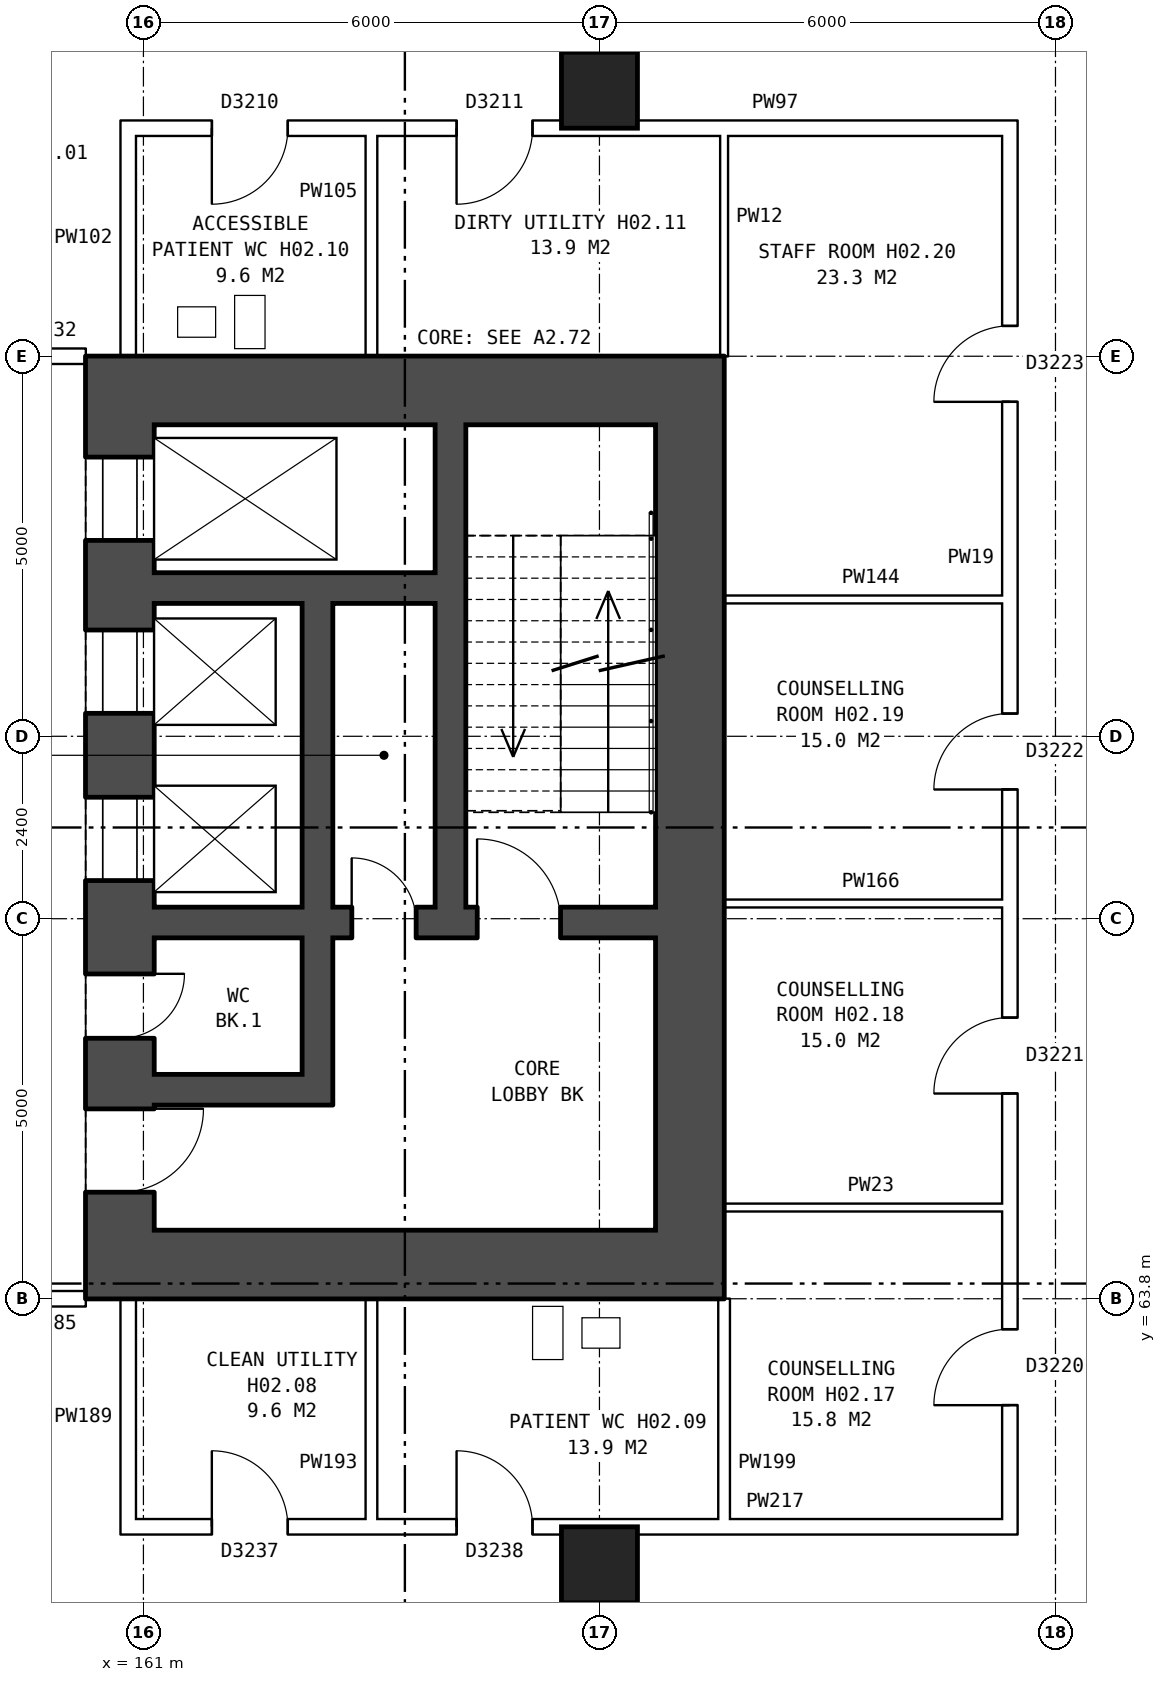
"""IFC4 building model, lengths in metres.
Left out: names, types, materials, properties, quantities, classifications, styles, units other than length and angle.
Written with IfcOpenShell. Run it as: python <this file> out.ifc"""

import sys

from ifc_helpers import new_model, si_unit, direction, frame, frame_2d, origin, origin_2d, place, context, subcontext, project, spatial, rectangle, extrude, element, fill, save


model = new_model("IFC4")
c1 = context("Model", 3, precision=1e-05, world=origin(), true_north=direction((0.0, 1.0)))
c2 = subcontext(c1, "Body", "Model", "MODEL_VIEW")
j1 = project(units=[si_unit("LENGTHUNIT", "METRE"), si_unit("PLANEANGLEUNIT", "RADIAN")], contexts=[c1])
p1 = place(None, origin())
s1 = spatial("IfcSite", under=j1, at=p1, CompositionType="ELEMENT")
p2 = place(p1, origin())
s2 = spatial("IfcBuilding", under=s1, at=p2, CompositionType="ELEMENT")
p3 = place(p2, frame((0.0, 0.0, 10.1)))
s3 = spatial("IfcBuildingStorey", under=s2, at=p3, CompositionType="ELEMENT", Elevation=10.1)
for number, where, z_axis, x_axis in (
    (1, (167.0, 60.3, 0.0), (0.0, 0.0, 1.0), (1.0, 0.0, 0.0)),
    (2, (167.0, 79.7, 0.0), (0.0, 0.0, 1.0), (1.0, 0.0, 0.0)),
):
    element("IfcColumn", number, at=place(p3, frame(where, z_axis=z_axis, x_axis=x_axis)), inside=s3, PredefinedType="COLUMN", context=c2, shape_type="SweptSolid", body=[
        extrude(rectangle(XDim=1.0, YDim=1.0, at=origin_2d()), origin(), (0.0, 0.0, 1.0), 4.3),
    ])
p4 = place(p3, frame((160.69, 75.3, 0.0), z_axis=(0.0, 0.0, 1.0), x_axis=(0.0, -1.0, 0.0)))
e3 = element("IfcWall", 3, at=p4, inside=s3, PredefinedType="SHEAR", context=c2, shape_type="SweptSolid", body=[
    extrude(rectangle(XDim=10.6, YDim=0.9, at=frame_2d((5.3, 0.0))), origin(), (0.0, 0.0, 1.0), 4.3),
])
p5 = place(p4, frame((0.425, 0.0, 0.0)))
e4 = element("IfcOpeningElement", 4, at=p5, cuts=e3, PredefinedType="OPENING", context=c2, shape_type="SweptSolid", body=[
    extrude(rectangle(XDim=1.1, YDim=2.1, at=frame_2d((0.55, 1.05))), frame((0.0, 0.46, 0.0), z_axis=(0.0, -1.0, 0.0), x_axis=(1.0, 0.0, 0.0)), (0.0, 0.0, 1.0), 0.92),
])
p6 = place(p4, frame((2.7, 0.0, 0.0)))
e5 = element("IfcOpeningElement", 5, at=p6, cuts=e3, PredefinedType="OPENING", context=c2, shape_type="SweptSolid", body=[
    extrude(rectangle(XDim=1.1, YDim=2.1, at=frame_2d((0.55, 1.05))), frame((0.0, 0.46, 0.0), z_axis=(0.0, -1.0, 0.0), x_axis=(1.0, 0.0, 0.0)), (0.0, 0.0, 1.0), 0.92),
])
p7 = place(p4, frame((4.9, 0.0, 0.0)))
e6 = element("IfcOpeningElement", 6, at=p7, cuts=e3, PredefinedType="OPENING", context=c2, shape_type="SweptSolid", body=[
    extrude(rectangle(XDim=1.1, YDim=2.1, at=frame_2d((0.55, 1.05))), frame((0.0, 0.46, 0.0), z_axis=(0.0, -1.0, 0.0), x_axis=(1.0, 0.0, 0.0)), (0.0, 0.0, 1.0), 0.92),
])
p8 = place(p4, frame((9.0, 0.0, 0.0)))
e7 = element("IfcOpeningElement", 7, at=p8, cuts=e3, PredefinedType="OPENING", context=c2, shape_type="SweptSolid", body=[
    extrude(rectangle(XDim=1.1, YDim=2.1, at=frame_2d((0.55, 1.05))), frame((0.0, 0.46, 0.0), z_axis=(0.0, -1.0, 0.0), x_axis=(1.0, 0.0, 0.0)), (0.0, 0.0, 1.0), 0.92),
])
p9 = place(p4, frame((7.225, 0.0, 0.0)))
e8 = element("IfcOpeningElement", 8, at=p9, cuts=e3, PredefinedType="OPENING", context=c2, shape_type="SweptSolid", body=[
    extrude(rectangle(XDim=0.85, YDim=2.1, at=frame_2d((0.425, 1.05))), frame((0.0, 0.46, 0.0), z_axis=(0.0, -1.0, 0.0), x_axis=(1.0, 0.0, 0.0)), (0.0, 0.0, 1.0), 0.92),
])
p10 = place(p3, frame((168.19, 75.3, 0.0), z_axis=(0.0, 0.0, 1.0), x_axis=(0.0, -1.0, 0.0)))
e9 = element("IfcWall", 9, at=p10, inside=s3, PredefinedType="SHEAR", context=c2, shape_type="SweptSolid", body=[
    extrude(rectangle(XDim=10.6, YDim=0.9, at=frame_2d((5.3, 0.0))), origin(), (0.0, 0.0, 1.0), 4.3),
])
for number, where, z_axis, x_axis in (
    (10, (160.24, 75.75, 0.0), (0.0, 0.0, 1.0), (1.0, 0.0, 0.0)),
    (11, (160.24, 64.25, 0.0), (0.0, 0.0, 1.0), (1.0, 0.0, 0.0)),
):
    element("IfcWall", number, at=place(p3, frame(where, z_axis=z_axis, x_axis=x_axis)), inside=s3, PredefinedType="SHEAR", context=c2, shape_type="SweptSolid", body=[
        extrude(rectangle(XDim=8.4, YDim=0.9, at=frame_2d((4.2, 0.0))), origin(), (0.0, 0.0, 1.0), 4.3),
    ])
p11 = place(p3, frame((161.14, 73.15, 0.0), z_axis=(0.0, 0.0, 1.0), x_axis=(1.0, 0.0, 0.0)))
e12 = element("IfcWall", 12, at=p11, inside=s3, PredefinedType="SHEAR", context=c2, shape_type="SweptSolid", body=[
    extrude(rectangle(XDim=3.7, YDim=0.4, at=frame_2d((1.85, 0.0))), origin(), (0.0, 0.0, 1.0), 4.3),
])
p12 = place(p3, frame((161.14, 68.75, 0.0), z_axis=(0.0, 0.0, 1.0), x_axis=(1.0, 0.0, 0.0)))
e13 = element("IfcWall", 13, at=p12, inside=s3, PredefinedType="SHEAR", context=c2, shape_type="SweptSolid", body=[
    extrude(rectangle(XDim=6.6, YDim=0.4, at=frame_2d((3.3, 0.0))), origin(), (0.0, 0.0, 1.0), 4.3),
])
p13 = place(p12, frame((4.25, 0.0, 0.0)))
e14 = element("IfcOpeningElement", 14, at=p13, cuts=e13, PredefinedType="OPENING", context=c2, shape_type="SweptSolid", body=[
    extrude(rectangle(XDim=1.1, YDim=2.1, at=frame_2d((0.55, 1.05))), frame((0.0, 0.21, 0.0), z_axis=(0.0, -1.0, 0.0), x_axis=(1.0, 0.0, 0.0)), (0.0, 0.0, 1.0), 0.42),
])
p14 = place(p12, frame((2.6, 0.0, 0.0)))
e15 = element("IfcOpeningElement", 15, at=p14, cuts=e13, PredefinedType="OPENING", context=c2, shape_type="SweptSolid", body=[
    extrude(rectangle(XDim=0.85, YDim=2.1, at=frame_2d((0.425, 1.05))), frame((0.0, 0.21, 0.0), z_axis=(0.0, -1.0, 0.0), x_axis=(1.0, 0.0, 0.0)), (0.0, 0.0, 1.0), 0.42),
])
p15 = place(p3, frame((161.14, 66.55, 0.0), z_axis=(0.0, 0.0, 1.0), x_axis=(1.0, 0.0, 0.0)))
e16 = element("IfcWall", 16, at=p15, inside=s3, PredefinedType="SHEAR", context=c2, shape_type="SweptSolid", body=[
    extrude(rectangle(XDim=1.95, YDim=0.4, at=frame_2d((0.975, 0.0))), origin(), (0.0, 0.0, 1.0), 4.3),
])
p16 = place(p3, frame((163.29, 72.95, 0.0), z_axis=(0.0, 0.0, 1.0), x_axis=(0.0, -1.0, 0.0)))
e17 = element("IfcWall", 17, at=p16, inside=s3, PredefinedType="SHEAR", context=c2, shape_type="SweptSolid", body=[
    extrude(rectangle(XDim=4.0, YDim=0.4, at=frame_2d((2.0, 0.0))), origin(), (0.0, 0.0, 1.0), 4.3),
])
p17 = place(p3, frame((163.29, 68.55, 0.0), z_axis=(0.0, 0.0, 1.0), x_axis=(0.0, -1.0, 0.0)))
e18 = element("IfcWall", 18, at=p17, inside=s3, PredefinedType="SHEAR", context=c2, shape_type="SweptSolid", body=[
    extrude(rectangle(XDim=2.2, YDim=0.4, at=frame_2d((1.1, 0.0))), origin(), (0.0, 0.0, 1.0), 4.3),
])
p18 = place(p3, frame((165.04, 75.3, 0.0), z_axis=(0.0, 0.0, 1.0), x_axis=(0.0, -1.0, 0.0)))
e19 = element("IfcWall", 19, at=p18, inside=s3, PredefinedType="SHEAR", context=c2, shape_type="SweptSolid", body=[
    extrude(rectangle(XDim=6.35, YDim=0.4, at=frame_2d((3.175, 0.0))), origin(), (0.0, 0.0, 1.0), 4.3),
])
p19 = place(p3, frame((160.7, 60.8, 0.0), z_axis=(0.0, 0.0, 1.0), x_axis=(1.0, 0.0, 0.0)))
e20 = element("IfcWall", 20, at=p19, inside=s3, PredefinedType="PARTITIONING", context=c2, shape_type="SweptSolid", body=[
    extrude(rectangle(XDim=11.8, YDim=0.2, at=frame_2d((5.9, 0.0))), origin(), (0.0, 0.0, 1.0), 4.3),
])
p20 = place(p19, frame((1.2, 0.0, 0.0)))
e21 = element("IfcOpeningElement", 21, at=p20, cuts=e20, PredefinedType="OPENING", context=c2, shape_type="SweptSolid", body=[
    extrude(rectangle(XDim=1.0, YDim=2.1, at=frame_2d((0.5, 1.05))), frame((0.0, 0.11, 0.0), z_axis=(0.0, -1.0, 0.0), x_axis=(1.0, 0.0, 0.0)), (0.0, 0.0, 1.0), 0.22),
])
p21 = place(p19, frame((4.42, 0.0, 0.0)))
e22 = element("IfcOpeningElement", 22, at=p21, cuts=e20, PredefinedType="OPENING", context=c2, shape_type="SweptSolid", body=[
    extrude(rectangle(XDim=1.0, YDim=2.1, at=frame_2d((0.5, 1.05))), frame((0.0, 0.11, 0.0), z_axis=(0.0, -1.0, 0.0), x_axis=(1.0, 0.0, 0.0)), (0.0, 0.0, 1.0), 0.22),
])
p22 = place(p3, frame((157.65, 63.8, 0.0), z_axis=(0.0, 0.0, 1.0), x_axis=(1.0, 0.0, 0.0)))
e23 = element("IfcWall", 23, at=p22, inside=s3, PredefinedType="PARTITIONING", context=c2, shape_type="SweptSolid", body=[
    extrude(rectangle(XDim=2.59, YDim=0.2, at=frame_2d((1.295, 0.0))), origin(), (0.0, 0.0, 1.0), 4.3),
])
p23 = place(p22, frame((0.59, 0.0, 0.0)))
e24 = element("IfcOpeningElement", 24, at=p23, cuts=e23, PredefinedType="OPENING", context=c2, shape_type="SweptSolid", body=[
    extrude(rectangle(XDim=1.0, YDim=2.1, at=frame_2d((0.5, 1.05))), frame((0.0, 0.11, 0.0), z_axis=(0.0, -1.0, 0.0), x_axis=(1.0, 0.0, 0.0)), (0.0, 0.0, 1.0), 0.22),
])
for number, where, z_axis, x_axis in (
    (25, (168.64, 65.0, 0.0), (0.0, 0.0, 1.0), (1.0, 0.0, 0.0)),
    (26, (168.64, 69.0, 0.0), (0.0, 0.0, 1.0), (1.0, 0.0, 0.0)),
    (27, (168.64, 73.0, 0.0), (0.0, 0.0, 1.0), (1.0, 0.0, 0.0)),
):
    element("IfcWall", number, at=place(p3, frame(where, z_axis=z_axis, x_axis=x_axis)), inside=s3, PredefinedType="PARTITIONING", context=c2, shape_type="SweptSolid", body=[
        extrude(rectangle(XDim=3.86, YDim=0.1, at=frame_2d((1.93, 0.0))), origin(), (0.0, 0.0, 1.0), 4.3),
    ])
p24 = place(p3, frame((157.65, 76.2, 0.0), z_axis=(0.0, 0.0, 1.0), x_axis=(1.0, 0.0, 0.0)))
e28 = element("IfcWall", 28, at=p24, inside=s3, PredefinedType="PARTITIONING", context=c2, shape_type="SweptSolid", body=[
    extrude(rectangle(XDim=2.59, YDim=0.2, at=frame_2d((1.295, 0.0))), origin(), (0.0, 0.0, 1.0), 4.3),
])
p25 = place(p24, frame((0.59, 0.0, 0.0)))
e29 = element("IfcOpeningElement", 29, at=p25, cuts=e28, PredefinedType="OPENING", context=c2, shape_type="SweptSolid", body=[
    extrude(rectangle(XDim=1.0, YDim=2.1, at=frame_2d((0.5, 1.05))), frame((0.0, 0.11, 0.0), z_axis=(0.0, -1.0, 0.0), x_axis=(1.0, 0.0, 0.0)), (0.0, 0.0, 1.0), 0.22),
])
p26 = place(p3, frame((160.7, 79.2, 0.0), z_axis=(0.0, 0.0, 1.0), x_axis=(1.0, 0.0, 0.0)))
e30 = element("IfcWall", 30, at=p26, inside=s3, PredefinedType="PARTITIONING", context=c2, shape_type="SweptSolid", body=[
    extrude(rectangle(XDim=11.8, YDim=0.2, at=frame_2d((5.9, 0.0))), origin(), (0.0, 0.0, 1.0), 4.3),
])
p27 = place(p26, frame((1.2, 0.0, 0.0)))
e31 = element("IfcOpeningElement", 31, at=p27, cuts=e30, PredefinedType="OPENING", context=c2, shape_type="SweptSolid", body=[
    extrude(rectangle(XDim=1.0, YDim=2.1, at=frame_2d((0.5, 1.05))), frame((0.0, 0.11, 0.0), z_axis=(0.0, -1.0, 0.0), x_axis=(1.0, 0.0, 0.0)), (0.0, 0.0, 1.0), 0.22),
])
p28 = place(p26, frame((4.42, 0.0, 0.0)))
e32 = element("IfcOpeningElement", 32, at=p28, cuts=e30, PredefinedType="OPENING", context=c2, shape_type="SweptSolid", body=[
    extrude(rectangle(XDim=1.0, YDim=2.1, at=frame_2d((0.5, 1.05))), frame((0.0, 0.11, 0.0), z_axis=(0.0, -1.0, 0.0), x_axis=(1.0, 0.0, 0.0)), (0.0, 0.0, 1.0), 0.22),
])
for number, where, z_axis, x_axis in (
    (33, (160.8, 60.7, 0.0), (0.0, 0.0, 1.0), (0.0, 1.0, 0.0)),
    (34, (160.8, 76.2, 0.0), (0.0, 0.0, 1.0), (0.0, 1.0, 0.0)),
):
    element("IfcWall", number, at=place(p3, frame(where, z_axis=z_axis, x_axis=x_axis)), inside=s3, PredefinedType="PARTITIONING", context=c2, shape_type="SweptSolid", body=[
        extrude(rectangle(XDim=3.1, YDim=0.2, at=frame_2d((1.55, 0.0))), origin(), (0.0, 0.0, 1.0), 4.3),
    ])
for number, where, z_axis, x_axis in (
    (35, (164.0, 60.7, 0.0), (0.0, 0.0, 1.0), (0.0, 1.0, 0.0)),
    (36, (164.0, 76.2, 0.0), (0.0, 0.0, 1.0), (0.0, 1.0, 0.0)),
):
    element("IfcWall", number, at=place(p3, frame(where, z_axis=z_axis, x_axis=x_axis)), inside=s3, PredefinedType="PLUMBINGWALL", context=c2, shape_type="SweptSolid", body=[
        extrude(rectangle(XDim=3.1, YDim=0.15, at=frame_2d((1.55, 0.0))), origin(), (0.0, 0.0, 1.0), 4.3),
    ])
p29 = place(p3, frame((168.64, 76.2, 0.0), z_axis=(0.0, 0.0, 1.0), x_axis=(0.0, 1.0, 0.0)))
e37 = element("IfcWall", 37, at=p29, inside=s3, PredefinedType="PARTITIONING", context=c2, shape_type="SweptSolid", body=[
    extrude(rectangle(XDim=3.1, YDim=0.1, at=frame_2d((1.55, 0.0))), origin(), (0.0, 0.0, 1.0), 4.3),
])
p30 = place(p3, frame((168.64, 60.7, 0.0), z_axis=(0.0, 0.0, 1.0), x_axis=(0.0, 1.0, 0.0)))
e38 = element("IfcWall", 38, at=p30, inside=s3, PredefinedType="PLUMBINGWALL", context=c2, shape_type="SweptSolid", body=[
    extrude(rectangle(XDim=3.1, YDim=0.15, at=frame_2d((1.55, 0.0))), origin(), (0.0, 0.0, 1.0), 4.3),
])
p31 = place(p3, frame((172.4, 60.7, 0.0), z_axis=(0.0, 0.0, 1.0), x_axis=(0.0, 1.0, 0.0)))
e39 = element("IfcWall", 39, at=p31, inside=s3, PredefinedType="PARTITIONING", context=c2, shape_type="SweptSolid", body=[
    extrude(rectangle(XDim=18.6, YDim=0.2, at=frame_2d((9.3, 0.0))), origin(), (0.0, 0.0, 1.0), 4.3),
])
p32 = place(p31, frame((1.7, 0.0, 0.0)))
e40 = element("IfcOpeningElement", 40, at=p32, cuts=e39, PredefinedType="OPENING", context=c2, shape_type="SweptSolid", body=[
    extrude(rectangle(XDim=1.0, YDim=2.1, at=frame_2d((0.5, 1.05))), frame((0.0, 0.11, 0.0), z_axis=(0.0, -1.0, 0.0), x_axis=(1.0, 0.0, 0.0)), (0.0, 0.0, 1.0), 0.22),
])
p33 = place(p31, frame((5.8, 0.0, 0.0)))
e41 = element("IfcOpeningElement", 41, at=p33, cuts=e39, PredefinedType="OPENING", context=c2, shape_type="SweptSolid", body=[
    extrude(rectangle(XDim=1.0, YDim=2.1, at=frame_2d((0.5, 1.05))), frame((0.0, 0.11, 0.0), z_axis=(0.0, -1.0, 0.0), x_axis=(1.0, 0.0, 0.0)), (0.0, 0.0, 1.0), 0.22),
])
p34 = place(p31, frame((9.8, 0.0, 0.0)))
e42 = element("IfcOpeningElement", 42, at=p34, cuts=e39, PredefinedType="OPENING", context=c2, shape_type="SweptSolid", body=[
    extrude(rectangle(XDim=1.0, YDim=2.1, at=frame_2d((0.5, 1.05))), frame((0.0, 0.11, 0.0), z_axis=(0.0, -1.0, 0.0), x_axis=(1.0, 0.0, 0.0)), (0.0, 0.0, 1.0), 0.22),
])
p35 = place(p31, frame((14.9, 0.0, 0.0)))
e43 = element("IfcOpeningElement", 43, at=p35, cuts=e39, PredefinedType="OPENING", context=c2, shape_type="SweptSolid", body=[
    extrude(rectangle(XDim=1.0, YDim=2.1, at=frame_2d((0.5, 1.05))), frame((0.0, 0.11, 0.0), z_axis=(0.0, -1.0, 0.0), x_axis=(1.0, 0.0, 0.0)), (0.0, 0.0, 1.0), 0.22),
])
p36 = place(p5, origin())
e44 = element("IfcDoor", 44, at=p36, inside=s3, OperationType="DOUBLE_DOOR_SLIDING", PredefinedType="DOOR", context=c2, shape_type="SweptSolid", body=[
    extrude(rectangle(XDim=1.1, YDim=2.1, at=frame_2d((0.55, 1.05))), frame((0.0, 0.435, 0.0), z_axis=(0.0, -1.0, 0.0), x_axis=(1.0, 0.0, 0.0)), (0.0, 0.0, 1.0), 0.05),
])
fill(e4, e44)
p37 = place(p6, origin())
e45 = element("IfcDoor", 45, at=p37, inside=s3, OperationType="DOUBLE_DOOR_SLIDING", PredefinedType="DOOR", context=c2, shape_type="SweptSolid", body=[
    extrude(rectangle(XDim=1.1, YDim=2.1, at=frame_2d((0.55, 1.05))), frame((0.0, 0.435, 0.0), z_axis=(0.0, -1.0, 0.0), x_axis=(1.0, 0.0, 0.0)), (0.0, 0.0, 1.0), 0.05),
])
fill(e5, e45)
p38 = place(p7, origin())
e46 = element("IfcDoor", 46, at=p38, inside=s3, OperationType="DOUBLE_DOOR_SLIDING", PredefinedType="DOOR", context=c2, shape_type="SweptSolid", body=[
    extrude(rectangle(XDim=1.1, YDim=2.1, at=frame_2d((0.55, 1.05))), frame((0.0, 0.435, 0.0), z_axis=(0.0, -1.0, 0.0), x_axis=(1.0, 0.0, 0.0)), (0.0, 0.0, 1.0), 0.05),
])
fill(e6, e46)
p39 = place(p8, origin())
e47 = element("IfcDoor", 47, at=p39, inside=s3, OperationType="SINGLE_SWING_LEFT", PredefinedType="DOOR", context=c2, shape_type="SweptSolid", body=[
    extrude(rectangle(XDim=1.1, YDim=2.1, at=frame_2d((0.55, 1.05))), frame((0.0, 0.435, 0.0), z_axis=(0.0, -1.0, 0.0), x_axis=(1.0, 0.0, 0.0)), (0.0, 0.0, 1.0), 0.05),
])
fill(e7, e47)
p40 = place(p13, origin())
e48 = element("IfcDoor", 48, at=p40, inside=s3, OperationType="SINGLE_SWING_LEFT", PredefinedType="DOOR", context=c2, shape_type="SweptSolid", body=[
    extrude(rectangle(XDim=1.1, YDim=2.1, at=frame_2d((0.55, 1.05))), frame((0.0, 0.025, 0.0), z_axis=(0.0, -1.0, 0.0), x_axis=(1.0, 0.0, 0.0)), (0.0, 0.0, 1.0), 0.05),
])
fill(e14, e48)
p41 = place(p9, origin())
e49 = element("IfcDoor", 49, at=p41, inside=s3, OperationType="SINGLE_SWING_LEFT", PredefinedType="DOOR", context=c2, shape_type="SweptSolid", body=[
    extrude(rectangle(XDim=0.85, YDim=2.1, at=frame_2d((0.425, 1.05))), frame((0.0, 0.435, 0.0), z_axis=(0.0, -1.0, 0.0), x_axis=(1.0, 0.0, 0.0)), (0.0, 0.0, 1.0), 0.05),
])
fill(e8, e49)
p42 = place(p14, origin())
e50 = element("IfcDoor", 50, at=p42, inside=s3, OperationType="SINGLE_SWING_LEFT", PredefinedType="DOOR", context=c2, shape_type="SweptSolid", body=[
    extrude(rectangle(XDim=0.85, YDim=2.1, at=frame_2d((0.425, 1.05))), frame((0.0, 0.025, 0.0), z_axis=(0.0, -1.0, 0.0), x_axis=(1.0, 0.0, 0.0)), (0.0, 0.0, 1.0), 0.05),
])
fill(e15, e50)
p43 = place(p20, origin())
e51 = element("IfcDoor", 51, at=p43, inside=s3, OperationType="SINGLE_SWING_LEFT", PredefinedType="DOOR", context=c2, shape_type="SweptSolid", body=[
    extrude(rectangle(XDim=1.0, YDim=2.1, at=frame_2d((0.5, 1.05))), frame((0.0, 0.025, 0.0), z_axis=(0.0, -1.0, 0.0), x_axis=(1.0, 0.0, 0.0)), (0.0, 0.0, 1.0), 0.05),
])
fill(e21, e51)
p44 = place(p21, origin())
e52 = element("IfcDoor", 52, at=p44, inside=s3, OperationType="SINGLE_SWING_LEFT", PredefinedType="DOOR", context=c2, shape_type="SweptSolid", body=[
    extrude(rectangle(XDim=1.0, YDim=2.1, at=frame_2d((0.5, 1.05))), frame((0.0, 0.025, 0.0), z_axis=(0.0, -1.0, 0.0), x_axis=(1.0, 0.0, 0.0)), (0.0, 0.0, 1.0), 0.05),
])
fill(e22, e52)
p45 = place(p27, frame((1.0, 0.0, 0.0), z_axis=(0.0, 0.0, 1.0), x_axis=(-1.0, 0.0, 0.0)))
e53 = element("IfcDoor", 53, at=p45, inside=s3, OperationType="SINGLE_SWING_RIGHT", PredefinedType="DOOR", context=c2, shape_type="SweptSolid", body=[
    extrude(rectangle(XDim=1.0, YDim=2.1, at=frame_2d((0.5, 1.05))), frame((0.0, 0.025, 0.0), z_axis=(0.0, -1.0, 0.0), x_axis=(1.0, 0.0, 0.0)), (0.0, 0.0, 1.0), 0.05),
])
fill(e31, e53)
p46 = place(p28, frame((1.0, 0.0, 0.0), z_axis=(0.0, 0.0, 1.0), x_axis=(-1.0, 0.0, 0.0)))
e54 = element("IfcDoor", 54, at=p46, inside=s3, OperationType="SINGLE_SWING_RIGHT", PredefinedType="DOOR", context=c2, shape_type="SweptSolid", body=[
    extrude(rectangle(XDim=1.0, YDim=2.1, at=frame_2d((0.5, 1.05))), frame((0.0, 0.025, 0.0), z_axis=(0.0, -1.0, 0.0), x_axis=(1.0, 0.0, 0.0)), (0.0, 0.0, 1.0), 0.05),
])
fill(e32, e54)
p47 = place(p32, origin())
e55 = element("IfcDoor", 55, at=p47, inside=s3, OperationType="SINGLE_SWING_LEFT", PredefinedType="DOOR", context=c2, shape_type="SweptSolid", body=[
    extrude(rectangle(XDim=1.0, YDim=2.1, at=frame_2d((0.5, 1.05))), frame((0.0, 0.025, 0.0), z_axis=(0.0, -1.0, 0.0), x_axis=(1.0, 0.0, 0.0)), (0.0, 0.0, 1.0), 0.05),
])
fill(e40, e55)
p48 = place(p33, origin())
e56 = element("IfcDoor", 56, at=p48, inside=s3, OperationType="SINGLE_SWING_LEFT", PredefinedType="DOOR", context=c2, shape_type="SweptSolid", body=[
    extrude(rectangle(XDim=1.0, YDim=2.1, at=frame_2d((0.5, 1.05))), frame((0.0, 0.025, 0.0), z_axis=(0.0, -1.0, 0.0), x_axis=(1.0, 0.0, 0.0)), (0.0, 0.0, 1.0), 0.05),
])
fill(e41, e56)
p49 = place(p34, origin())
e57 = element("IfcDoor", 57, at=p49, inside=s3, OperationType="SINGLE_SWING_LEFT", PredefinedType="DOOR", context=c2, shape_type="SweptSolid", body=[
    extrude(rectangle(XDim=1.0, YDim=2.1, at=frame_2d((0.5, 1.05))), frame((0.0, 0.025, 0.0), z_axis=(0.0, -1.0, 0.0), x_axis=(1.0, 0.0, 0.0)), (0.0, 0.0, 1.0), 0.05),
])
fill(e42, e57)
p50 = place(p35, origin())
e58 = element("IfcDoor", 58, at=p50, inside=s3, OperationType="SINGLE_SWING_LEFT", PredefinedType="DOOR", context=c2, shape_type="SweptSolid", body=[
    extrude(rectangle(XDim=1.0, YDim=2.1, at=frame_2d((0.5, 1.05))), frame((0.0, 0.025, 0.0), z_axis=(0.0, -1.0, 0.0), x_axis=(1.0, 0.0, 0.0)), (0.0, 0.0, 1.0), 0.05),
])
fill(e43, e58)
save(model, sys.argv[1])
